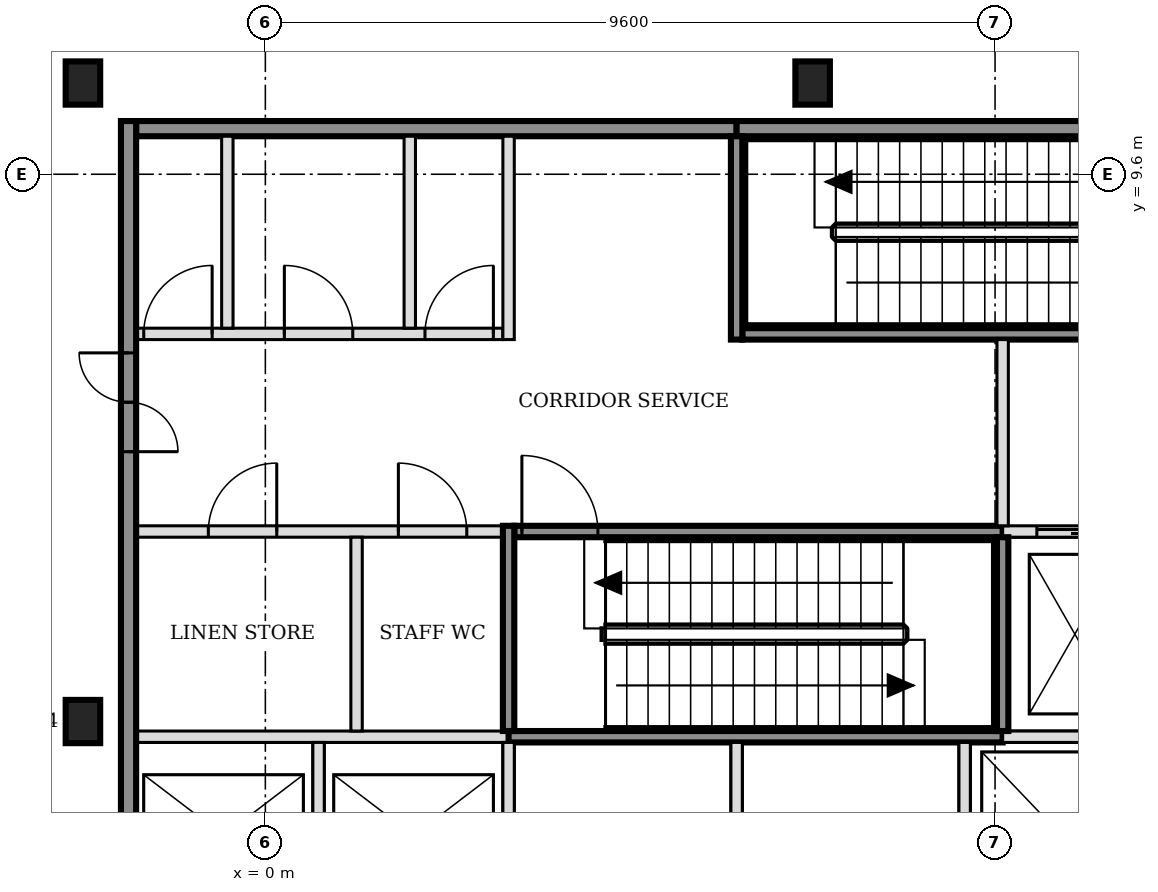
"""IFC4 building model, lengths in metres.
Left out: names, types, materials, properties, quantities, classifications, styles, units other than length and angle.
Written with IfcOpenShell. Run it as: python <this file> out.ifc"""

import sys

from ifc_helpers import new_model, si_unit, direction, frame, frame_2d, origin, origin_2d, place, context, subcontext, project, spatial, rectangle, i_section, extrude, element, fill, save


model = new_model("IFC4")
c1 = context("Model", 3, precision=1e-05, world=origin(), true_north=direction((0.0, 1.0)))
c2 = subcontext(c1, "Body", "Model", "MODEL_VIEW")
j1 = project(units=[si_unit("LENGTHUNIT", "METRE"), si_unit("PLANEANGLEUNIT", "RADIAN")], contexts=[c1])
p1 = place(None, origin())
s1 = spatial("IfcSite", under=j1, at=p1, CompositionType="ELEMENT")
p2 = place(p1, origin())
s2 = spatial("IfcBuilding", under=s1, at=p2, CompositionType="ELEMENT")
p3 = place(p2, frame((0.0, 0.0, 35.4)))
s3 = spatial("IfcBuildingStorey", under=s2, at=p3, CompositionType="ELEMENT", Elevation=35.4)
for number, where, z_axis, x_axis in (
    (1, (-2.4, 2.4, -0.2), (0.0, 0.0, 1.0), (1.0, 0.0, 0.0)),
    (2, (-2.4, 10.8, -0.2), (0.0, 0.0, 1.0), (1.0, 0.0, 0.0)),
    (3, (7.2, 10.8, -0.2), (0.0, 0.0, 1.0), (1.0, 0.0, 0.0)),
):
    element("IfcColumn", number, at=place(p3, frame(where, z_axis=z_axis, x_axis=x_axis)), inside=s3, PredefinedType="COLUMN", context=c2, shape_type="SweptSolid", body=[
        extrude(i_section(OverallWidth=0.454, OverallDepth=0.569, WebThickness=0.078, FlangeThickness=0.125, FilletRadius=0.015, at=origin_2d()), origin(), (0.0, 0.0, 1.0), 4.85),
    ])
p4 = place(p3, frame((-1.7, 2.2, 0.0), z_axis=(0.0, 0.0, 1.0), x_axis=(1.0, 0.0, 0.0)))
e4 = element("IfcWall", 4, at=p4, inside=s3, PredefinedType="SOLIDWALL", context=c2, shape_type="SweptSolid", body=[
    extrude(rectangle(XDim=4.9, YDim=0.15, at=frame_2d((2.45, 0.0))), origin(), (0.0, 0.0, 1.0), 4.65),
])
p5 = place(p3, frame((3.2, 2.2, 0.0), z_axis=(0.0, 0.0, 1.0), x_axis=(1.0, 0.0, 0.0)))
e5 = element("IfcWall", 5, at=p5, inside=s3, PredefinedType="SOLIDWALL", context=c2, shape_type="SweptSolid", body=[
    extrude(rectangle(XDim=6.5, YDim=0.15, at=frame_2d((3.25, 0.0))), origin(), (0.0, 0.0, 1.0), 4.65),
])
p6 = place(p3, frame((9.7, 2.2, 0.0), z_axis=(0.0, 0.0, 1.0), x_axis=(1.0, 0.0, 0.0)))
e6 = element("IfcWall", 6, at=p6, inside=s3, PredefinedType="SOLIDWALL", context=c2, shape_type="SweptSolid", body=[
    extrude(rectangle(XDim=4.525, YDim=0.15, at=frame_2d((2.263, 0.0))), origin(), (0.0, 0.0, 1.0), 4.65),
])
p7 = place(p3, frame((-1.7, 4.9, 0.0), z_axis=(0.0, 0.0, 1.0), x_axis=(1.0, 0.0, 0.0)))
e7 = element("IfcWall", 7, at=p7, inside=s3, PredefinedType="PARTITIONING", context=c2, shape_type="SweptSolid", body=[
    extrude(rectangle(XDim=4.825, YDim=0.15, at=frame_2d((2.413, 0.0))), origin(), (0.0, 0.0, 1.0), 4.65),
])
p8 = place(p7, frame((0.95, 0.0, 0.0)))
e8 = element("IfcOpeningElement", 8, at=p8, cuts=e7, PredefinedType="OPENING", context=c2, shape_type="SweptSolid", body=[
    extrude(rectangle(XDim=0.9, YDim=2.1, at=frame_2d((0.45, 1.05))), frame((0.0, 0.085, 0.0), z_axis=(0.0, -1.0, 0.0), x_axis=(1.0, 0.0, 0.0)), (0.0, 0.0, 1.0), 0.17),
])
p9 = place(p7, frame((3.45, 0.0, 0.0)))
e9 = element("IfcOpeningElement", 9, at=p9, cuts=e7, PredefinedType="OPENING", context=c2, shape_type="SweptSolid", body=[
    extrude(rectangle(XDim=0.9, YDim=2.1, at=frame_2d((0.45, 1.05))), frame((0.0, 0.085, 0.0), z_axis=(0.0, -1.0, 0.0), x_axis=(1.0, 0.0, 0.0)), (0.0, 0.0, 1.0), 0.17),
])
p10 = place(p3, frame((3.275, 4.9, 0.0), z_axis=(0.0, 0.0, 1.0), x_axis=(1.0, 0.0, 0.0)))
e10 = element("IfcWall", 10, at=p10, inside=s3, PredefinedType="SOLIDWALL", context=c2, shape_type="SweptSolid", body=[
    extrude(rectangle(XDim=6.425, YDim=0.15, at=frame_2d((3.212, 0.0))), origin(), (0.0, 0.0, 1.0), 4.65),
])
p11 = place(p10, frame((0.1, 0.0, 0.0)))
e11 = element("IfcOpeningElement", 11, at=p11, cuts=e10, PredefinedType="OPENING", context=c2, shape_type="SweptSolid", body=[
    extrude(rectangle(XDim=1.0, YDim=2.1, at=frame_2d((0.5, 1.05))), frame((0.0, 0.085, 0.0), z_axis=(0.0, -1.0, 0.0), x_axis=(1.0, 0.0, 0.0)), (0.0, 0.0, 1.0), 0.17),
])
p12 = place(p3, frame((9.7, 4.9, 0.0), z_axis=(0.0, 0.0, 1.0), x_axis=(1.0, 0.0, 0.0)))
e12 = element("IfcWall", 12, at=p12, inside=s3, PredefinedType="SOLIDWALL", context=c2, shape_type="SweptSolid", body=[
    extrude(rectangle(XDim=6.4, YDim=0.15, at=frame_2d((3.2, 0.0))), origin(), (0.0, 0.0, 1.0), 4.65),
])
p13 = place(p12, frame((0.45, 0.0, 0.0)))
e13 = element("IfcOpeningElement", 13, at=p13, cuts=e12, PredefinedType="OPENING", context=c2, shape_type="SweptSolid", body=[
    extrude(rectangle(XDim=1.0, YDim=2.1, at=frame_2d((0.5, 1.05))), frame((0.0, 0.085, 0.0), z_axis=(0.0, -1.0, 0.0), x_axis=(1.0, 0.0, 0.0)), (0.0, 0.0, 1.0), 0.17),
])
p14 = place(p12, frame((2.35, 0.0, 0.0)))
e14 = element("IfcOpeningElement", 14, at=p14, cuts=e12, PredefinedType="OPENING", context=c2, shape_type="SweptSolid", body=[
    extrude(rectangle(XDim=1.0, YDim=2.1, at=frame_2d((0.5, 1.05))), frame((0.0, 0.085, 0.0), z_axis=(0.0, -1.0, 0.0), x_axis=(1.0, 0.0, 0.0)), (0.0, 0.0, 1.0), 0.17),
])
p15 = place(p12, frame((4.7, 0.0, 0.0)))
e15 = element("IfcOpeningElement", 15, at=p15, cuts=e12, PredefinedType="OPENING", context=c2, shape_type="SweptSolid", body=[
    extrude(rectangle(XDim=0.9, YDim=2.1, at=frame_2d((0.45, 1.05))), frame((0.0, 0.085, 0.0), z_axis=(0.0, -1.0, 0.0), x_axis=(1.0, 0.0, 0.0)), (0.0, 0.0, 1.0), 0.17),
])
p16 = place(p3, frame((-1.7, 7.5, 0.0), z_axis=(0.0, 0.0, 1.0), x_axis=(1.0, 0.0, 0.0)))
e16 = element("IfcWall", 16, at=p16, inside=s3, PredefinedType="PARTITIONING", context=c2, shape_type="SweptSolid", body=[
    extrude(rectangle(XDim=4.825, YDim=0.15, at=frame_2d((2.413, 0.0))), origin(), (0.0, 0.0, 1.0), 4.65),
])
p17 = place(p16, frame((0.1, 0.0, 0.0)))
e17 = element("IfcOpeningElement", 17, at=p17, cuts=e16, PredefinedType="OPENING", context=c2, shape_type="SweptSolid", body=[
    extrude(rectangle(XDim=0.9, YDim=2.1, at=frame_2d((0.45, 1.05))), frame((0.0, 0.085, 0.0), z_axis=(0.0, -1.0, 0.0), x_axis=(1.0, 0.0, 0.0)), (0.0, 0.0, 1.0), 0.17),
])
p18 = place(p16, frame((1.95, 0.0, 0.0)))
e18 = element("IfcOpeningElement", 18, at=p18, cuts=e16, PredefinedType="OPENING", context=c2, shape_type="SweptSolid", body=[
    extrude(rectangle(XDim=0.9, YDim=2.1, at=frame_2d((0.45, 1.05))), frame((0.0, 0.085, 0.0), z_axis=(0.0, -1.0, 0.0), x_axis=(1.0, 0.0, 0.0)), (0.0, 0.0, 1.0), 0.17),
])
p19 = place(p16, frame((3.8, 0.0, 0.0)))
e19 = element("IfcOpeningElement", 19, at=p19, cuts=e16, PredefinedType="OPENING", context=c2, shape_type="SweptSolid", body=[
    extrude(rectangle(XDim=0.9, YDim=2.1, at=frame_2d((0.45, 1.05))), frame((0.0, 0.085, 0.0), z_axis=(0.0, -1.0, 0.0), x_axis=(1.0, 0.0, 0.0)), (0.0, 0.0, 1.0), 0.17),
])
p20 = place(p3, frame((6.275, 7.5, 0.0), z_axis=(0.0, 0.0, 1.0), x_axis=(1.0, 0.0, 0.0)))
e20 = element("IfcWall", 20, at=p20, inside=s3, PredefinedType="SOLIDWALL", context=c2, shape_type="SweptSolid", body=[
    extrude(rectangle(XDim=6.425, YDim=0.15, at=frame_2d((3.212, 0.0))), origin(), (0.0, 0.0, 1.0), 4.65),
])
p21 = place(p20, frame((5.225, 0.0, 0.0)))
e21 = element("IfcOpeningElement", 21, at=p21, cuts=e20, PredefinedType="OPENING", context=c2, shape_type="SweptSolid", body=[
    extrude(rectangle(XDim=1.0, YDim=2.1, at=frame_2d((0.5, 1.05))), frame((0.0, 0.085, 0.0), z_axis=(0.0, -1.0, 0.0), x_axis=(1.0, 0.0, 0.0)), (0.0, 0.0, 1.0), 0.17),
])
p22 = place(p3, frame((-1.7, 10.2, 0.0), z_axis=(0.0, 0.0, 1.0), x_axis=(1.0, 0.0, 0.0)))
e22 = element("IfcWall", 22, at=p22, inside=s3, PredefinedType="SOLIDWALL", context=c2, shape_type="SweptSolid", body=[
    extrude(rectangle(XDim=7.9, YDim=0.2, at=frame_2d((3.95, 0.0))), origin(), (0.0, 0.0, 1.0), 4.65),
])
p23 = place(p3, frame((6.2, 10.2, 0.0), z_axis=(0.0, 0.0, 1.0), x_axis=(1.0, 0.0, 0.0)))
e23 = element("IfcWall", 23, at=p23, inside=s3, PredefinedType="SOLIDWALL", context=c2, shape_type="SweptSolid", body=[
    extrude(rectangle(XDim=6.5, YDim=0.2, at=frame_2d((3.25, 0.0))), origin(), (0.0, 0.0, 1.0), 4.65),
])
p24 = place(p3, frame((-1.8, -5.5, 0.0), z_axis=(0.0, 0.0, 1.0), x_axis=(0.0, 1.0, 0.0)))
e24 = element("IfcWall", 24, at=p24, inside=s3, PredefinedType="SOLIDWALL", context=c2, shape_type="SweptSolid", body=[
    extrude(rectangle(XDim=15.8, YDim=0.2, at=frame_2d((7.9, 0.0))), origin(), (0.0, 0.0, 1.0), 4.65),
])
p25 = place(p24, frame((3.05, 0.0, 0.0)))
e25 = element("IfcOpeningElement", 25, at=p25, cuts=e24, PredefinedType="OPENING", context=c2, shape_type="SweptSolid", body=[
    extrude(rectangle(XDim=1.3, YDim=2.1, at=frame_2d((0.65, 1.05))), frame((0.0, 0.11, 0.0), z_axis=(0.0, -1.0, 0.0), x_axis=(1.0, 0.0, 0.0)), (0.0, 0.0, 1.0), 0.22),
])
p26 = place(p24, frame((11.45, 0.0, 0.0)))
e26 = element("IfcOpeningElement", 26, at=p26, cuts=e24, PredefinedType="OPENING", context=c2, shape_type="SweptSolid", body=[
    extrude(rectangle(XDim=1.3, YDim=2.1, at=frame_2d((0.65, 1.05))), frame((0.0, 0.11, 0.0), z_axis=(0.0, -1.0, 0.0), x_axis=(1.0, 0.0, 0.0)), (0.0, 0.0, 1.0), 0.22),
])
p27 = place(p3, frame((-0.5, 7.575, 0.0), z_axis=(0.0, 0.0, 1.0), x_axis=(0.0, 1.0, 0.0)))
e27 = element("IfcWall", 27, at=p27, inside=s3, PredefinedType="PARTITIONING", context=c2, shape_type="SweptSolid", body=[
    extrude(rectangle(XDim=2.525, YDim=0.15, at=frame_2d((1.263, 0.0))), origin(), (0.0, 0.0, 1.0), 4.65),
])
p28 = place(p3, frame((0.7, -0.325, 0.0), z_axis=(0.0, 0.0, 1.0), x_axis=(0.0, 1.0, 0.0)))
e28 = element("IfcWall", 28, at=p28, inside=s3, PredefinedType="SOLIDWALL", context=c2, shape_type="SweptSolid", body=[
    extrude(rectangle(XDim=2.45, YDim=0.15, at=frame_2d((1.225, 0.0))), origin(), (0.0, 0.0, 1.0), 4.65),
])
p29 = place(p3, frame((1.2, 2.275, 0.0), z_axis=(0.0, 0.0, 1.0), x_axis=(0.0, 1.0, 0.0)))
e29 = element("IfcWall", 29, at=p29, inside=s3, PredefinedType="PARTITIONING", context=c2, shape_type="SweptSolid", body=[
    extrude(rectangle(XDim=2.55, YDim=0.15, at=frame_2d((1.275, 0.0))), origin(), (0.0, 0.0, 1.0), 4.65),
])
p30 = place(p3, frame((1.9, 7.575, 0.0), z_axis=(0.0, 0.0, 1.0), x_axis=(0.0, 1.0, 0.0)))
e30 = element("IfcWall", 30, at=p30, inside=s3, PredefinedType="PARTITIONING", context=c2, shape_type="SweptSolid", body=[
    extrude(rectangle(XDim=2.525, YDim=0.15, at=frame_2d((1.263, 0.0))), origin(), (0.0, 0.0, 1.0), 4.65),
])
p31 = place(p3, frame((3.2, -0.325, 0.0), z_axis=(0.0, 0.0, 1.0), x_axis=(0.0, 1.0, 0.0)))
e31 = element("IfcWall", 31, at=p31, inside=s3, PredefinedType="SOLIDWALL", context=c2, shape_type="SweptSolid", body=[
    extrude(rectangle(XDim=2.45, YDim=0.15, at=frame_2d((1.225, 0.0))), origin(), (0.0, 0.0, 1.0), 4.65),
])
p32 = place(p3, frame((3.2, 2.275, 0.0), z_axis=(0.0, 0.0, 1.0), x_axis=(0.0, 1.0, 0.0)))
e32 = element("IfcWall", 32, at=p32, inside=s3, PredefinedType="SOLIDWALL", context=c2, shape_type="SweptSolid", body=[
    extrude(rectangle(XDim=2.7, YDim=0.15, at=frame_2d((1.35, 0.0))), origin(), (0.0, 0.0, 1.0), 4.65),
])
p33 = place(p3, frame((3.2, 7.425, 0.0), z_axis=(0.0, 0.0, 1.0), x_axis=(0.0, 1.0, 0.0)))
e33 = element("IfcWall", 33, at=p33, inside=s3, PredefinedType="PARTITIONING", context=c2, shape_type="SweptSolid", body=[
    extrude(rectangle(XDim=2.675, YDim=0.15, at=frame_2d((1.337, 0.0))), origin(), (0.0, 0.0, 1.0), 4.65),
])
p34 = place(p3, frame((6.2, -0.325, 0.0), z_axis=(0.0, 0.0, 1.0), x_axis=(0.0, 1.0, 0.0)))
e34 = element("IfcWall", 34, at=p34, inside=s3, PredefinedType="SOLIDWALL", context=c2, shape_type="SweptSolid", body=[
    extrude(rectangle(XDim=2.45, YDim=0.15, at=frame_2d((1.225, 0.0))), origin(), (0.0, 0.0, 1.0), 4.65),
])
p35 = place(p3, frame((6.2, 7.425, 0.0), z_axis=(0.0, 0.0, 1.0), x_axis=(0.0, 1.0, 0.0)))
e35 = element("IfcWall", 35, at=p35, inside=s3, PredefinedType="SOLIDWALL", context=c2, shape_type="SweptSolid", body=[
    extrude(rectangle(XDim=2.675, YDim=0.15, at=frame_2d((1.337, 0.0))), origin(), (0.0, 0.0, 1.0), 4.65),
])
p36 = place(p3, frame((9.2, -0.325, 0.0), z_axis=(0.0, 0.0, 1.0), x_axis=(0.0, 1.0, 0.0)))
e36 = element("IfcWall", 36, at=p36, inside=s3, PredefinedType="SOLIDWALL", context=c2, shape_type="SweptSolid", body=[
    extrude(rectangle(XDim=2.45, YDim=0.15, at=frame_2d((1.225, 0.0))), origin(), (0.0, 0.0, 1.0), 4.65),
])
p37 = place(p3, frame((9.7, 2.275, 0.0), z_axis=(0.0, 0.0, 1.0), x_axis=(0.0, 1.0, 0.0)))
e37 = element("IfcWall", 37, at=p37, inside=s3, PredefinedType="SOLIDWALL", context=c2, shape_type="SweptSolid", body=[
    extrude(rectangle(XDim=2.55, YDim=0.15, at=frame_2d((1.275, 0.0))), origin(), (0.0, 0.0, 1.0), 4.65),
])
p38 = place(p3, frame((9.7, 4.975, 0.0), z_axis=(0.0, 0.0, 1.0), x_axis=(0.0, 1.0, 0.0)))
e38 = element("IfcWall", 38, at=p38, inside=s3, PredefinedType="SOLIDWALL", context=c2, shape_type="SweptSolid", body=[
    extrude(rectangle(XDim=2.45, YDim=0.15, at=frame_2d((1.225, 0.0))), origin(), (0.0, 0.0, 1.0), 4.65),
])
p39 = place(p13, origin())
e39 = element("IfcDoor", 39, at=p39, inside=s3, OperationType="DOUBLE_DOOR_SLIDING", PredefinedType="DOOR", context=c2, shape_type="SweptSolid", body=[
    extrude(rectangle(XDim=1.0, YDim=2.1, at=frame_2d((0.5, 1.05))), frame((0.0, 0.025, 0.0), z_axis=(0.0, -1.0, 0.0), x_axis=(1.0, 0.0, 0.0)), (0.0, 0.0, 1.0), 0.05),
])
fill(e13, e39)
p40 = place(p11, origin())
e40 = element("IfcDoor", 40, at=p40, inside=s3, OperationType="SINGLE_SWING_LEFT", PredefinedType="DOOR", context=c2, shape_type="SweptSolid", body=[
    extrude(rectangle(XDim=1.0, YDim=2.1, at=frame_2d((0.5, 1.05))), frame((0.0, 0.025, 0.0), z_axis=(0.0, -1.0, 0.0), x_axis=(1.0, 0.0, 0.0)), (0.0, 0.0, 1.0), 0.05),
])
fill(e11, e40)
p41 = place(p26, origin())
e41 = element("IfcDoor", 41, at=p41, inside=s3, OperationType="DOUBLE_DOOR_SINGLE_SWING", PredefinedType="DOOR", context=c2, shape_type="SweptSolid", body=[
    extrude(rectangle(XDim=1.3, YDim=2.1, at=frame_2d((0.65, 1.05))), frame((0.0, 0.025, 0.0), z_axis=(0.0, -1.0, 0.0), x_axis=(1.0, 0.0, 0.0)), (0.0, 0.0, 1.0), 0.05),
])
fill(e26, e41)
p42 = place(p8, origin())
e42 = element("IfcDoor", 42, at=p42, inside=s3, OperationType="SINGLE_SWING_RIGHT", PredefinedType="DOOR", context=c2, shape_type="SweptSolid", body=[
    extrude(rectangle(XDim=0.9, YDim=2.1, at=frame_2d((0.45, 1.05))), frame((0.0, 0.025, 0.0), z_axis=(0.0, -1.0, 0.0), x_axis=(1.0, 0.0, 0.0)), (0.0, 0.0, 1.0), 0.05),
])
fill(e8, e42)
p43 = place(p9, origin())
e43 = element("IfcDoor", 43, at=p43, inside=s3, OperationType="SINGLE_SWING_LEFT", PredefinedType="DOOR", context=c2, shape_type="SweptSolid", body=[
    extrude(rectangle(XDim=0.9, YDim=2.1, at=frame_2d((0.45, 1.05))), frame((0.0, 0.025, 0.0), z_axis=(0.0, -1.0, 0.0), x_axis=(1.0, 0.0, 0.0)), (0.0, 0.0, 1.0), 0.05),
])
fill(e9, e43)
p44 = place(p17, origin())
e44 = element("IfcDoor", 44, at=p44, inside=s3, OperationType="SINGLE_SWING_RIGHT", PredefinedType="DOOR", context=c2, shape_type="SweptSolid", body=[
    extrude(rectangle(XDim=0.9, YDim=2.1, at=frame_2d((0.45, 1.05))), frame((0.0, 0.025, 0.0), z_axis=(0.0, -1.0, 0.0), x_axis=(1.0, 0.0, 0.0)), (0.0, 0.0, 1.0), 0.05),
])
fill(e17, e44)
p45 = place(p18, origin())
e45 = element("IfcDoor", 45, at=p45, inside=s3, OperationType="SINGLE_SWING_LEFT", PredefinedType="DOOR", context=c2, shape_type="SweptSolid", body=[
    extrude(rectangle(XDim=0.9, YDim=2.1, at=frame_2d((0.45, 1.05))), frame((0.0, 0.025, 0.0), z_axis=(0.0, -1.0, 0.0), x_axis=(1.0, 0.0, 0.0)), (0.0, 0.0, 1.0), 0.05),
])
fill(e18, e45)
p46 = place(p19, origin())
e46 = element("IfcDoor", 46, at=p46, inside=s3, OperationType="SINGLE_SWING_RIGHT", PredefinedType="DOOR", context=c2, shape_type="SweptSolid", body=[
    extrude(rectangle(XDim=0.9, YDim=2.1, at=frame_2d((0.45, 1.05))), frame((0.0, 0.025, 0.0), z_axis=(0.0, -1.0, 0.0), x_axis=(1.0, 0.0, 0.0)), (0.0, 0.0, 1.0), 0.05),
])
fill(e19, e46)
save(model, sys.argv[1])
